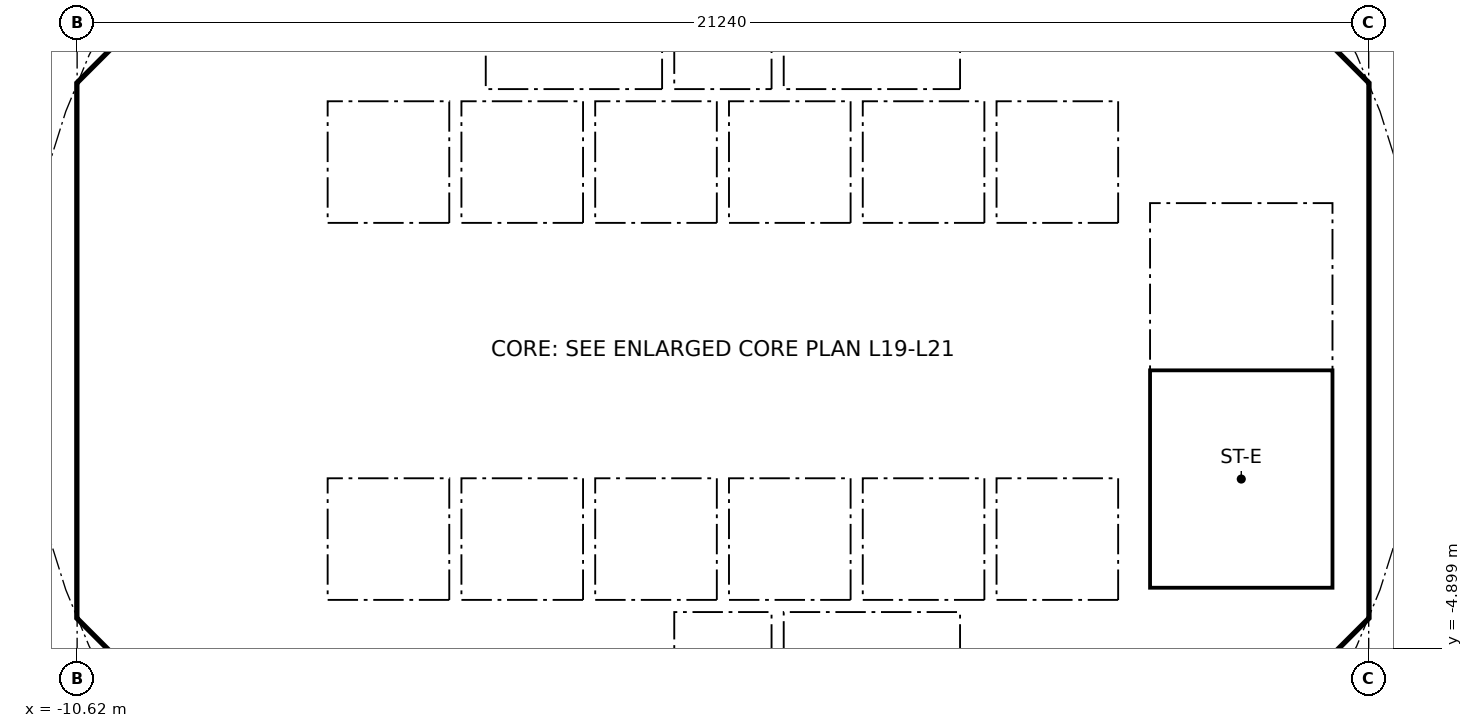
"""IFC4 building model, lengths in metres.
Left out: names, types, materials, properties, quantities, classifications, styles, units other than length and angle.
Written with IfcOpenShell. Run it as: python <this file> out.ifc"""

import sys

from ifc_helpers import new_model, si_unit, direction, frame, frame_2d, origin, place, context, subcontext, project, spatial, polyline, rectangle, outline, extrude, element, fill, save


model = new_model("IFC4")
c1 = context("Model", 3, precision=1e-05, world=origin(), true_north=direction((0.0, 1.0)))
c2 = subcontext(c1, "Body", "Model", "MODEL_VIEW")
j1 = project(units=[si_unit("LENGTHUNIT", "METRE"), si_unit("PLANEANGLEUNIT", "RADIAN")], contexts=[c1])
p1 = place(None, origin())
s1 = spatial("IfcSite", under=j1, at=p1, CompositionType="ELEMENT")
p2 = place(p1, origin())
s2 = spatial("IfcBuilding", under=s1, at=p2, CompositionType="ELEMENT")
p3 = place(p2, frame((0.0, 0.0, 80.7)))
s3 = spatial("IfcBuildingStorey", under=s2, at=p3, CompositionType="ELEMENT", Elevation=80.7)
p4 = place(p3, frame((9.988, 4.613, 0.0), z_axis=(0.0, 0.0, 1.0), x_axis=(-0.707106781187, 0.707106781187, 0.0)))
e1 = element("IfcWall", 1, at=p4, inside=s3, PredefinedType="SHEAR", context=c2, shape_type="SweptSolid", body=[
    extrude(rectangle(XDim=7.602, YDim=0.6, at=frame_2d((3.801, 0.0))), origin(), (0.0, 0.0, 1.0), 3.44),
])
p5 = place(p4, frame((3.201, 0.0, 0.0)))
e2 = element("IfcOpeningElement", 2, at=p5, cuts=e1, PredefinedType="OPENING", context=c2, shape_type="SweptSolid", body=[
    extrude(rectangle(XDim=1.2, YDim=2.1, at=frame_2d((0.6, 1.05))), frame((0.0, 0.31, 0.0), z_axis=(0.0, -1.0, 0.0), x_axis=(1.0, 0.0, 0.0)), (0.0, 0.0, 1.0), 0.62),
])
p6 = place(p3, frame((-4.613, 9.988, 0.0), z_axis=(0.0, 0.0, 1.0), x_axis=(-0.707106781187, -0.707106781187, 0.0)))
e3 = element("IfcWall", 3, at=p6, inside=s3, PredefinedType="SHEAR", context=c2, shape_type="SweptSolid", body=[
    extrude(rectangle(XDim=7.602, YDim=0.6, at=frame_2d((3.801, 0.0))), origin(), (0.0, 0.0, 1.0), 3.44),
])
p7 = place(p6, frame((0.351, 0.0, 0.0)))
e4 = element("IfcOpeningElement", 4, at=p7, cuts=e3, PredefinedType="OPENING", context=c2, shape_type="SweptSolid", body=[
    extrude(rectangle(XDim=1.1, YDim=2.1, at=frame_2d((0.55, 1.05))), frame((0.0, 0.31, 0.0), z_axis=(0.0, -1.0, 0.0), x_axis=(1.0, 0.0, 0.0)), (0.0, 0.0, 1.0), 0.62),
])
p8 = place(p3, frame((-10.325, 3.801, 0.0), z_axis=(0.0, 0.0, 1.0), x_axis=(0.0, -1.0, 0.0)))
e5 = element("IfcWall", 5, at=p8, inside=s3, PredefinedType="SHEAR", context=c2, shape_type="SweptSolid", body=[
    extrude(rectangle(XDim=7.602, YDim=0.6, at=frame_2d((3.801, 0.0))), origin(), (0.0, 0.0, 1.0), 3.44),
])
p9 = place(p8, frame((0.651, 0.0, 0.0)))
e6 = element("IfcOpeningElement", 6, at=p9, cuts=e5, PredefinedType="OPENING", context=c2, shape_type="SweptSolid", body=[
    extrude(rectangle(XDim=1.5, YDim=2.1, at=frame_2d((0.75, 1.05))), frame((0.0, 0.31, 0.0), z_axis=(0.0, -1.0, 0.0), x_axis=(1.0, 0.0, 0.0)), (0.0, 0.0, 1.0), 0.62),
])
p10 = place(p8, frame((5.451, 0.0, 0.0)))
e7 = element("IfcOpeningElement", 7, at=p10, cuts=e5, PredefinedType="OPENING", context=c2, shape_type="SweptSolid", body=[
    extrude(rectangle(XDim=1.5, YDim=2.1, at=frame_2d((0.75, 1.05))), frame((0.0, 0.31, 0.0), z_axis=(0.0, -1.0, 0.0), x_axis=(1.0, 0.0, 0.0)), (0.0, 0.0, 1.0), 0.62),
])
p11 = place(p3, frame((-9.988, -4.613, 0.0), z_axis=(0.0, 0.0, 1.0), x_axis=(0.707106781187, -0.707106781187, 0.0)))
e8 = element("IfcWall", 8, at=p11, inside=s3, PredefinedType="SHEAR", context=c2, shape_type="SweptSolid", body=[
    extrude(rectangle(XDim=7.602, YDim=0.6, at=frame_2d((3.801, 0.0))), origin(), (0.0, 0.0, 1.0), 3.44),
])
p12 = place(p11, frame((6.151, 0.0, 0.0)))
e9 = element("IfcOpeningElement", 9, at=p12, cuts=e8, PredefinedType="OPENING", context=c2, shape_type="SweptSolid", body=[
    extrude(rectangle(XDim=1.1, YDim=2.1, at=frame_2d((0.55, 1.05))), frame((0.0, 0.31, 0.0), z_axis=(0.0, -1.0, 0.0), x_axis=(1.0, 0.0, 0.0)), (0.0, 0.0, 1.0), 0.62),
])
p13 = place(p3, frame((4.613, -9.988, 0.0), z_axis=(0.0, 0.0, 1.0), x_axis=(0.707106781187, 0.707106781187, 0.0)))
e10 = element("IfcWall", 10, at=p13, inside=s3, PredefinedType="SHEAR", context=c2, shape_type="SweptSolid", body=[
    extrude(rectangle(XDim=7.602, YDim=0.6, at=frame_2d((3.801, 0.0))), origin(), (0.0, 0.0, 1.0), 3.44),
])
p14 = place(p13, frame((3.201, 0.0, 0.0)))
e11 = element("IfcOpeningElement", 11, at=p14, cuts=e10, PredefinedType="OPENING", context=c2, shape_type="SweptSolid", body=[
    extrude(rectangle(XDim=1.2, YDim=2.1, at=frame_2d((0.6, 1.05))), frame((0.0, 0.31, 0.0), z_axis=(0.0, -1.0, 0.0), x_axis=(1.0, 0.0, 0.0)), (0.0, 0.0, 1.0), 0.62),
])
p15 = place(p3, frame((-5.8, 4.3, 0.0), z_axis=(0.0, 0.0, 1.0), x_axis=(0.0, 1.0, 0.0)))
e12 = element("IfcWall", 12, at=p15, inside=s3, PredefinedType="PARTITIONING", context=c2, shape_type="SweptSolid", body=[
    extrude(rectangle(XDim=3.927, YDim=0.15, at=frame_2d((1.963, 0.0))), origin(), (0.0, 0.0, 1.0), 3.44),
])
p16 = place(p15, frame((1.551, 0.0, 0.0)))
e13 = element("IfcOpeningElement", 13, at=p16, cuts=e12, PredefinedType="OPENING", context=c2, shape_type="SweptSolid", body=[
    extrude(rectangle(XDim=0.9, YDim=2.1, at=frame_2d((0.45, 1.05))), frame((0.0, 0.085, 0.0), z_axis=(0.0, -1.0, 0.0), x_axis=(1.0, 0.0, 0.0)), (0.0, 0.0, 1.0), 0.17),
])
p17 = place(p3, frame((4.0, 4.3, 0.0), z_axis=(0.0, 0.0, 1.0), x_axis=(0.0, 1.0, 0.0)))
e14 = element("IfcWall", 14, at=p17, inside=s3, PredefinedType="SOLIDWALL", context=c2, shape_type="SweptSolid", body=[
    extrude(rectangle(XDim=2.2, YDim=0.2, at=frame_2d((1.1, 0.0))), origin(), (0.0, 0.0, 1.0), 3.44),
])
p18 = place(p17, frame((0.55, 0.0, 0.0)))
e15 = element("IfcOpeningElement", 15, at=p18, cuts=e14, PredefinedType="OPENING", context=c2, shape_type="SweptSolid", body=[
    extrude(rectangle(XDim=1.1, YDim=2.1, at=frame_2d((0.55, 1.05))), frame((0.0, 0.11, 0.0), z_axis=(0.0, -1.0, 0.0), x_axis=(1.0, 0.0, 0.0)), (0.0, 0.0, 1.0), 0.22),
])
p19 = place(p3, frame((-4.0, 4.3, 0.0), z_axis=(0.0, 0.0, 1.0), x_axis=(0.0, 1.0, 0.0)))
e16 = element("IfcWall", 16, at=p19, inside=s3, PredefinedType="SOLIDWALL", context=c2, shape_type="SweptSolid", body=[
    extrude(rectangle(XDim=2.2, YDim=0.2, at=frame_2d((1.1, 0.0))), origin(), (0.0, 0.0, 1.0), 3.44),
])
p20 = place(p19, frame((0.55, 0.0, 0.0)))
e17 = element("IfcOpeningElement", 17, at=p20, cuts=e16, PredefinedType="OPENING", context=c2, shape_type="SweptSolid", body=[
    extrude(rectangle(XDim=1.1, YDim=2.1, at=frame_2d((0.55, 1.05))), frame((0.0, 0.11, 0.0), z_axis=(0.0, -1.0, 0.0), x_axis=(1.0, 0.0, 0.0)), (0.0, 0.0, 1.0), 0.22),
])
p21 = place(p3, frame((-6.7, 2.0, 0.0), z_axis=(0.0, 0.0, 1.0), x_axis=(1.0, 0.0, 0.0)))
e18 = element("IfcWall", 18, at=p21, inside=s3, PredefinedType="SOLIDWALL", context=c2, shape_type="SweptSolid", body=[
    extrude(rectangle(XDim=13.4, YDim=0.2, at=frame_2d((6.7, 0.0))), origin(), (0.0, 0.0, 1.0), 3.44),
])
p22 = place(p21, frame((0.65, 0.0, 0.0)))
e19 = element("IfcOpeningElement", 19, at=p22, cuts=e18, PredefinedType="OPENING", context=c2, shape_type="SweptSolid", body=[
    extrude(rectangle(XDim=1.1, YDim=2.1, at=frame_2d((0.55, 1.05))), frame((0.0, 0.11, 0.0), z_axis=(0.0, -1.0, 0.0), x_axis=(1.0, 0.0, 0.0)), (0.0, 0.0, 1.0), 0.22),
])
p23 = place(p21, frame((2.85, 0.0, 0.0)))
e20 = element("IfcOpeningElement", 20, at=p23, cuts=e18, PredefinedType="OPENING", context=c2, shape_type="SweptSolid", body=[
    extrude(rectangle(XDim=1.1, YDim=2.1, at=frame_2d((0.55, 1.05))), frame((0.0, 0.11, 0.0), z_axis=(0.0, -1.0, 0.0), x_axis=(1.0, 0.0, 0.0)), (0.0, 0.0, 1.0), 0.22),
])
p24 = place(p21, frame((5.05, 0.0, 0.0)))
e21 = element("IfcOpeningElement", 21, at=p24, cuts=e18, PredefinedType="OPENING", context=c2, shape_type="SweptSolid", body=[
    extrude(rectangle(XDim=1.1, YDim=2.1, at=frame_2d((0.55, 1.05))), frame((0.0, 0.11, 0.0), z_axis=(0.0, -1.0, 0.0), x_axis=(1.0, 0.0, 0.0)), (0.0, 0.0, 1.0), 0.22),
])
p25 = place(p3, frame((6.7, 4.0, 0.0), z_axis=(0.0, 0.0, 1.0), x_axis=(1.0, 0.0, 0.0)))
e22 = element("IfcWall", 22, at=p25, inside=s3, PredefinedType="SOLIDWALL", context=c2, shape_type="SweptSolid", body=[
    extrude(rectangle(XDim=3.325, YDim=0.2, at=frame_2d((1.662, 0.0))), origin(), (0.0, 0.0, 1.0), 3.44),
])
p26 = place(p25, frame((1.25, 0.0, 0.0)))
e23 = element("IfcOpeningElement", 23, at=p26, cuts=e22, PredefinedType="OPENING", context=c2, shape_type="SweptSolid", body=[
    extrude(rectangle(XDim=1.1, YDim=2.1, at=frame_2d((0.55, 1.05))), frame((0.0, 0.11, 0.0), z_axis=(0.0, -1.0, 0.0), x_axis=(1.0, 0.0, 0.0)), (0.0, 0.0, 1.0), 0.22),
])
p27 = place(p3, frame((-6.2, -7.827, 0.0), z_axis=(0.0, 0.0, 1.0), x_axis=(0.0, 1.0, 0.0)))
e24 = element("IfcWall", 24, at=p27, inside=s3, PredefinedType="PARTITIONING", context=c2, shape_type="SweptSolid", body=[
    extrude(rectangle(XDim=3.527, YDim=0.15, at=frame_2d((1.763, 0.0))), origin(), (0.0, 0.0, 1.0), 3.44),
])
p28 = place(p27, frame((2.365, 0.0, 0.0)))
e25 = element("IfcOpeningElement", 25, at=p28, cuts=e24, PredefinedType="OPENING", context=c2, shape_type="SweptSolid", body=[
    extrude(rectangle(XDim=0.9, YDim=2.1, at=frame_2d((0.45, 1.05))), frame((0.0, 0.085, 0.0), z_axis=(0.0, -1.0, 0.0), x_axis=(1.0, 0.0, 0.0)), (0.0, 0.0, 1.0), 0.17),
])
p29 = place(p27, frame((0.489, 0.0, 0.0)))
e26 = element("IfcOpeningElement", 26, at=p29, cuts=e24, PredefinedType="OPENING", context=c2, shape_type="SweptSolid", body=[
    extrude(rectangle(XDim=0.9, YDim=2.1, at=frame_2d((0.45, 1.05))), frame((0.0, 0.085, 0.0), z_axis=(0.0, -1.0, 0.0), x_axis=(1.0, 0.0, 0.0)), (0.0, 0.0, 1.0), 0.17),
])
p30 = place(p3, frame((4.0, -6.5, 0.0), z_axis=(0.0, 0.0, 1.0), x_axis=(0.0, 1.0, 0.0)))
e27 = element("IfcWall", 27, at=p30, inside=s3, PredefinedType="SOLIDWALL", context=c2, shape_type="SweptSolid", body=[
    extrude(rectangle(XDim=2.2, YDim=0.2, at=frame_2d((1.1, 0.0))), origin(), (0.0, 0.0, 1.0), 3.44),
])
p31 = place(p30, frame((0.55, 0.0, 0.0)))
e28 = element("IfcOpeningElement", 28, at=p31, cuts=e27, PredefinedType="OPENING", context=c2, shape_type="SweptSolid", body=[
    extrude(rectangle(XDim=1.1, YDim=2.1, at=frame_2d((0.55, 1.05))), frame((0.0, 0.11, 0.0), z_axis=(0.0, -1.0, 0.0), x_axis=(1.0, 0.0, 0.0)), (0.0, 0.0, 1.0), 0.22),
])
p32 = place(p3, frame((-4.0, -6.5, 0.0), z_axis=(0.0, 0.0, 1.0), x_axis=(0.0, 1.0, 0.0)))
e29 = element("IfcWall", 29, at=p32, inside=s3, PredefinedType="SOLIDWALL", context=c2, shape_type="SweptSolid", body=[
    extrude(rectangle(XDim=2.2, YDim=0.2, at=frame_2d((1.1, 0.0))), origin(), (0.0, 0.0, 1.0), 3.44),
])
p33 = place(p32, frame((0.65, 0.0, 0.0)))
e30 = element("IfcOpeningElement", 30, at=p33, cuts=e29, PredefinedType="OPENING", context=c2, shape_type="SweptSolid", body=[
    extrude(rectangle(XDim=0.9, YDim=2.1, at=frame_2d((0.45, 1.05))), frame((0.0, 0.11, 0.0), z_axis=(0.0, -1.0, 0.0), x_axis=(1.0, 0.0, 0.0)), (0.0, 0.0, 1.0), 0.22),
])
p34 = place(p3, frame((-6.7, -2.0, 0.0), z_axis=(0.0, 0.0, 1.0), x_axis=(1.0, 0.0, 0.0)))
e31 = element("IfcWall", 31, at=p34, inside=s3, PredefinedType="SOLIDWALL", context=c2, shape_type="SweptSolid", body=[
    extrude(rectangle(XDim=13.4, YDim=0.2, at=frame_2d((6.7, 0.0))), origin(), (0.0, 0.0, 1.0), 3.44),
])
p35 = place(p34, frame((0.65, 0.0, 0.0)))
e32 = element("IfcOpeningElement", 32, at=p35, cuts=e31, PredefinedType="OPENING", context=c2, shape_type="SweptSolid", body=[
    extrude(rectangle(XDim=1.1, YDim=2.1, at=frame_2d((0.55, 1.05))), frame((0.0, 0.11, 0.0), z_axis=(0.0, -1.0, 0.0), x_axis=(1.0, 0.0, 0.0)), (0.0, 0.0, 1.0), 0.22),
])
p36 = place(p34, frame((2.85, 0.0, 0.0)))
e33 = element("IfcOpeningElement", 33, at=p36, cuts=e31, PredefinedType="OPENING", context=c2, shape_type="SweptSolid", body=[
    extrude(rectangle(XDim=1.1, YDim=2.1, at=frame_2d((0.55, 1.05))), frame((0.0, 0.11, 0.0), z_axis=(0.0, -1.0, 0.0), x_axis=(1.0, 0.0, 0.0)), (0.0, 0.0, 1.0), 0.22),
])
p37 = place(p3, origin())
e34 = element("IfcWall", 34, at=p37, inside=s3, PredefinedType="SHEAR", context=c2, shape_type="SweptSolid", body=[
    extrude(outline(polyline([(-10.625, -3.801), (-10.025, -3.801), (-10.025, -4.152), (-9.776, -4.401), (-10.2, -4.825), (-10.625, -4.401), (-10.625, -3.801)])), origin(), (0.0, 0.0, 1.0), 3.44),
])
p38 = place(p3, origin())
e35 = element("IfcWall", 35, at=p38, inside=s3, PredefinedType="SHEAR", context=c2, shape_type="SweptSolid", body=[
    extrude(outline(polyline([(-10.2, 4.825), (-9.776, 4.401), (-10.025, 4.152), (-10.025, 3.801), (-10.625, 3.801), (-10.625, 4.401), (-10.2, 4.825)])), origin(), (0.0, 0.0, 1.0), 3.44),
])
p39 = place(p3, origin())
e36 = element("IfcWall", 36, at=p39, inside=s3, PredefinedType="SHEAR", context=c2, shape_type="SweptSolid", body=[
    extrude(outline(polyline([(9.776, -4.401), (10.025, -4.152), (10.025, -3.801), (10.025, 4.152), (9.776, 4.401), (10.2, 4.825), (10.625, 4.401), (10.625, -4.401), (10.2, -4.825), (9.776, -4.401)])), origin(), (0.0, 0.0, 1.0), 3.44),
])
for number, where, z_axis, x_axis in (
    (37, (-0.9, -6.5, 0.0), (0.0, 0.0, 1.0), (0.0, 1.0, 0.0)),
    (38, (0.9, -6.5, 0.0), (0.0, 0.0, 1.0), (0.0, 1.0, 0.0)),
):
    element("IfcWall", number, at=place(p3, frame(where, z_axis=z_axis, x_axis=x_axis)), inside=s3, PredefinedType="SOLIDWALL", context=c2, shape_type="SweptSolid", body=[
        extrude(rectangle(XDim=2.2, YDim=0.2, at=frame_2d((1.1, 0.0))), origin(), (0.0, 0.0, 1.0), 3.44),
    ])
p40 = place(p3, origin())
e39 = element("IfcWall", 39, at=p40, inside=s3, PredefinedType="SOLIDWALL", context=c2, shape_type="SweptSolid", body=[
    extrude(outline(polyline([(-6.7, -2.1), (-6.5, -2.1), (-6.5, -4.1), (-4.5, -4.1), (-4.5, -2.1), (-4.3, -2.1), (-4.3, -4.1), (-2.3, -4.1), (-2.3, -2.1), (-2.1, -2.1), (-2.1, -4.1), (-0.1, -4.1), (-0.1, -2.1), (0.1, -2.1), (0.1, -4.1), (2.1, -4.1), (2.1, -2.1), (2.3, -2.1), (2.3, -4.1), (4.3, -4.1), (4.3, -2.1), (4.5, -2.1), (4.5, -4.1), (6.5, -4.1), (6.5, -2.1), (6.7, -2.1), (6.7, -4.3), (-6.7, -4.3), (-6.7, -2.1)])), origin(), (0.0, 0.0, 1.0), 3.44),
])
for number, where, z_axis, x_axis in (
    (40, (-0.9, 4.3, 0.0), (0.0, 0.0, 1.0), (0.0, 1.0, 0.0)),
    (41, (0.9, 4.3, 0.0), (0.0, 0.0, 1.0), (0.0, 1.0, 0.0)),
):
    element("IfcWall", number, at=place(p3, frame(where, z_axis=z_axis, x_axis=x_axis)), inside=s3, PredefinedType="SOLIDWALL", context=c2, shape_type="SweptSolid", body=[
        extrude(rectangle(XDim=2.2, YDim=0.2, at=frame_2d((1.1, 0.0))), origin(), (0.0, 0.0, 1.0), 3.44),
    ])
p41 = place(p3, origin())
e42 = element("IfcWall", 42, at=p41, inside=s3, PredefinedType="SOLIDWALL", context=c2, shape_type="SweptSolid", body=[
    extrude(outline(polyline([(-6.5, 2.1), (-6.7, 2.1), (-6.7, 4.3), (6.7, 4.3), (6.7, 2.1), (6.5, 2.1), (6.5, 4.1), (4.5, 4.1), (4.5, 2.1), (4.3, 2.1), (4.3, 4.1), (2.3, 4.1), (2.3, 2.1), (2.1, 2.1), (2.1, 4.1), (0.1, 4.1), (0.1, 2.1), (-0.1, 2.1), (-0.1, 4.1), (-2.1, 4.1), (-2.1, 2.1), (-2.3, 2.1), (-2.3, 4.1), (-4.3, 4.1), (-4.3, 2.1), (-4.5, 2.1), (-4.5, 4.1), (-6.5, 4.1), (-6.5, 2.1)])), origin(), (0.0, 0.0, 1.0), 3.44),
])
for number, where, z_axis, x_axis in (
    (43, (-10.025, -4.0, 0.0), (0.0, 0.0, 1.0), (1.0, 0.0, 0.0)),
    (44, (-10.025, 4.0, 0.0), (0.0, 0.0, 1.0), (1.0, 0.0, 0.0)),
):
    element("IfcWall", number, at=place(p3, frame(where, z_axis=z_axis, x_axis=x_axis)), inside=s3, PredefinedType="PARTITIONING", context=c2, shape_type="SweptSolid", body=[
        extrude(rectangle(XDim=3.325, YDim=0.2, at=frame_2d((1.662, 0.0))), origin(), (0.0, 0.0, 1.0), 3.44),
    ])
p42 = place(p3, origin())
e45 = element("IfcWall", 45, at=p42, inside=s3, PredefinedType="SOLIDWALL", context=c2, shape_type="SweptSolid", body=[
    extrude(outline(polyline([(7.025, -3.9), (6.7, -3.9), (6.7, 3.9), (7.025, 3.9), (7.025, -3.9)])), origin(), (0.0, 0.0, 1.0), 3.44),
])
p43 = place(p3, origin())
e46 = element("IfcWall", 46, at=p43, inside=s3, PredefinedType="SOLIDWALL", context=c2, shape_type="SweptSolid", body=[
    extrude(outline(polyline([(10.025, -4.1), (6.7, -4.1), (6.7, -3.9), (10.025, -3.9), (10.025, -4.1)])), origin(), (0.0, 0.0, 1.0), 3.44),
])
p44 = place(p22, origin())
e47 = element("IfcDoor", 47, at=p44, inside=s3, OperationType="DOUBLE_DOOR_SLIDING", PredefinedType="DOOR", context=c2, shape_type="SweptSolid", body=[
    extrude(rectangle(XDim=1.1, YDim=2.1, at=frame_2d((0.55, 1.05))), frame((0.0, 0.025, 0.0), z_axis=(0.0, -1.0, 0.0), x_axis=(1.0, 0.0, 0.0)), (0.0, 0.0, 1.0), 0.05),
])
fill(e19, e47)
p45 = place(p23, origin())
e48 = element("IfcDoor", 48, at=p45, inside=s3, OperationType="DOUBLE_DOOR_SLIDING", PredefinedType="DOOR", context=c2, shape_type="SweptSolid", body=[
    extrude(rectangle(XDim=1.1, YDim=2.1, at=frame_2d((0.55, 1.05))), frame((0.0, 0.025, 0.0), z_axis=(0.0, -1.0, 0.0), x_axis=(1.0, 0.0, 0.0)), (0.0, 0.0, 1.0), 0.05),
])
fill(e20, e48)
p46 = place(p24, origin())
e49 = element("IfcDoor", 49, at=p46, inside=s3, OperationType="DOUBLE_DOOR_SLIDING", PredefinedType="DOOR", context=c2, shape_type="SweptSolid", body=[
    extrude(rectangle(XDim=1.1, YDim=2.1, at=frame_2d((0.55, 1.05))), frame((0.0, 0.025, 0.0), z_axis=(0.0, -1.0, 0.0), x_axis=(1.0, 0.0, 0.0)), (0.0, 0.0, 1.0), 0.05),
])
fill(e21, e49)
p47 = place(p35, origin())
e50 = element("IfcDoor", 50, at=p47, inside=s3, OperationType="DOUBLE_DOOR_SLIDING", PredefinedType="DOOR", context=c2, shape_type="SweptSolid", body=[
    extrude(rectangle(XDim=1.1, YDim=2.1, at=frame_2d((0.55, 1.05))), frame((0.0, 0.025, 0.0), z_axis=(0.0, -1.0, 0.0), x_axis=(1.0, 0.0, 0.0)), (0.0, 0.0, 1.0), 0.05),
])
fill(e32, e50)
p48 = place(p36, origin())
e51 = element("IfcDoor", 51, at=p48, inside=s3, OperationType="DOUBLE_DOOR_SLIDING", PredefinedType="DOOR", context=c2, shape_type="SweptSolid", body=[
    extrude(rectangle(XDim=1.1, YDim=2.1, at=frame_2d((0.55, 1.05))), frame((0.0, 0.025, 0.0), z_axis=(0.0, -1.0, 0.0), x_axis=(1.0, 0.0, 0.0)), (0.0, 0.0, 1.0), 0.05),
])
fill(e33, e51)
p49 = place(p18, origin())
e52 = element("IfcDoor", 52, at=p49, inside=s3, OperationType="DOUBLE_DOOR_SLIDING", PredefinedType="DOOR", context=c2, shape_type="SweptSolid", body=[
    extrude(rectangle(XDim=1.1, YDim=2.1, at=frame_2d((0.55, 1.05))), frame((0.0, 0.025, 0.0), z_axis=(0.0, -1.0, 0.0), x_axis=(1.0, 0.0, 0.0)), (0.0, 0.0, 1.0), 0.05),
])
fill(e15, e52)
p50 = place(p31, origin())
e53 = element("IfcDoor", 53, at=p50, inside=s3, OperationType="DOUBLE_DOOR_SLIDING", PredefinedType="DOOR", context=c2, shape_type="SweptSolid", body=[
    extrude(rectangle(XDim=1.1, YDim=2.1, at=frame_2d((0.55, 1.05))), frame((0.0, 0.025, 0.0), z_axis=(0.0, -1.0, 0.0), x_axis=(1.0, 0.0, 0.0)), (0.0, 0.0, 1.0), 0.05),
])
fill(e28, e53)
p51 = place(p20, origin())
e54 = element("IfcDoor", 54, at=p51, inside=s3, OperationType="DOUBLE_DOOR_SLIDING", PredefinedType="DOOR", context=c2, shape_type="SweptSolid", body=[
    extrude(rectangle(XDim=1.1, YDim=2.1, at=frame_2d((0.55, 1.05))), frame((0.0, 0.025, 0.0), z_axis=(0.0, -1.0, 0.0), x_axis=(1.0, 0.0, 0.0)), (0.0, 0.0, 1.0), 0.05),
])
fill(e17, e54)
p52 = place(p26, frame((1.1, 0.0, 0.0), x_axis=(-1.0, 0.0, 0.0)))
e55 = element("IfcDoor", 55, at=p52, inside=s3, OperationType="SINGLE_SWING_RIGHT", PredefinedType="DOOR", context=c2, shape_type="SweptSolid", body=[
    extrude(rectangle(XDim=1.1, YDim=2.1, at=frame_2d((0.55, 1.05))), frame((0.0, 0.025, 0.0), z_axis=(0.0, -1.0, 0.0), x_axis=(1.0, 0.0, 0.0)), (0.0, 0.0, 1.0), 0.05),
])
fill(e23, e55)
p53 = place(p28, origin())
e56 = element("IfcDoor", 56, at=p53, inside=s3, OperationType="SINGLE_SWING_RIGHT", PredefinedType="DOOR", context=c2, shape_type="SweptSolid", body=[
    extrude(rectangle(XDim=0.9, YDim=2.1, at=frame_2d((0.45, 1.05))), frame((0.0, 0.025, 0.0), z_axis=(0.0, -1.0, 0.0), x_axis=(1.0, 0.0, 0.0)), (0.0, 0.0, 1.0), 0.05),
])
fill(e25, e56)
p54 = place(p9, origin())
e57 = element("IfcDoor", 57, at=p54, inside=s3, OperationType="DOUBLE_DOOR_SINGLE_SWING", PredefinedType="DOOR", context=c2, shape_type="SweptSolid", body=[
    extrude(rectangle(XDim=1.5, YDim=2.1, at=frame_2d((0.75, 1.05))), frame((0.0, 0.025, 0.0), z_axis=(0.0, -1.0, 0.0), x_axis=(1.0, 0.0, 0.0)), (0.0, 0.0, 1.0), 0.05),
])
fill(e6, e57)
p55 = place(p10, origin())
e58 = element("IfcDoor", 58, at=p55, inside=s3, OperationType="DOUBLE_DOOR_SINGLE_SWING", PredefinedType="DOOR", context=c2, shape_type="SweptSolid", body=[
    extrude(rectangle(XDim=1.5, YDim=2.1, at=frame_2d((0.75, 1.05))), frame((0.0, 0.025, 0.0), z_axis=(0.0, -1.0, 0.0), x_axis=(1.0, 0.0, 0.0)), (0.0, 0.0, 1.0), 0.05),
])
fill(e7, e58)
save(model, sys.argv[1])
